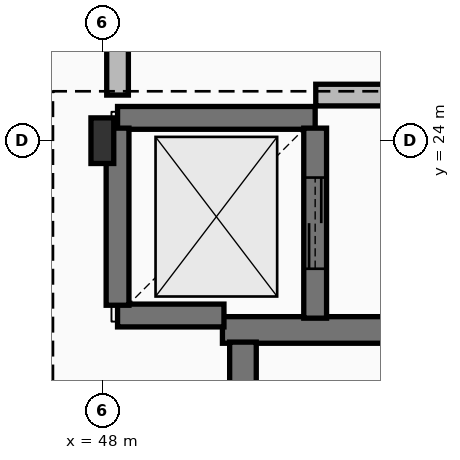
"""IFC4 building model, lengths in metres.
Left out: names, types, materials, properties, quantities, classifications, styles, units other than length and angle.
Written with IfcOpenShell. Run it as: python <this file> out.ifc"""

import sys

from ifc_helpers import new_model, si_unit, direction, frame, frame_2d, origin, origin_2d, place, context, subcontext, project, spatial, rectangle, i_section, extrude, element, fill, save


model = new_model("IFC4")
c1 = context("Model", 3, precision=1e-05, world=origin(), true_north=direction((0.0, 1.0)))
c2 = subcontext(c1, "Body", "Model", "MODEL_VIEW")
j1 = project(units=[si_unit("LENGTHUNIT", "METRE"), si_unit("PLANEANGLEUNIT", "RADIAN")], contexts=[c1])
p1 = place(None, origin())
s1 = spatial("IfcSite", under=j1, at=p1, CompositionType="ELEMENT")
p2 = place(p1, origin())
s2 = spatial("IfcBuilding", under=s1, at=p2, CompositionType="ELEMENT")
p3 = place(p2, frame((0.0, 0.0, 6.0)))
s3 = spatial("IfcBuildingStorey", under=s2, at=p3, CompositionType="ELEMENT", Elevation=6.0)
p4 = place(p3, frame((48.0, 24.0, 0.0), z_axis=(0.0, 0.0, 1.0), x_axis=(1.0, 0.0, 0.0)))
e1 = element("IfcColumn", 1, at=p4, inside=s3, PredefinedType="COLUMN", context=c2, shape_type="SweptSolid", body=[
    extrude(i_section(OverallWidth=0.3, OverallDepth=0.6, WebThickness=0.015, FlangeThickness=0.03, FilletRadius=0.027, at=origin_2d()), origin(), (0.0, 0.0, 1.0), 5.4),
])
p5 = place(p3, frame((60.73, 21.51, 0.0), z_axis=(0.0, 0.0, 1.0), x_axis=(-1.0, 0.0, 0.0)))
e2 = element("IfcWall", 2, at=p5, inside=s3, PredefinedType="SHEAR", context=c2, shape_type="SweptSolid", body=[
    extrude(rectangle(XDim=11.15, YDim=0.35, at=frame_2d((5.575, 0.0))), origin(), (0.0, 0.0, 1.0), 5.15),
])
p6 = place(p3, frame((49.85, 21.35, 0.0), z_axis=(0.0, 0.0, 1.0), x_axis=(0.0, -1.0, 0.0)))
e3 = element("IfcWall", 3, at=p6, inside=s3, PredefinedType="SHEAR", context=c2, shape_type="SweptSolid", body=[
    extrude(rectangle(XDim=5.14, YDim=0.35, at=frame_2d((2.57, 0.0))), origin(), (0.0, 0.0, 1.0), 5.15),
])
p7 = place(p3, frame((50.8, 24.3, 0.0), z_axis=(0.0, 0.0, 1.0), x_axis=(-1.0, 0.0, 0.0)))
e4 = element("IfcWall", 4, at=p7, inside=s3, PredefinedType="SHEAR", context=c2, shape_type="SweptSolid", body=[
    extrude(rectangle(XDim=2.6, YDim=0.3, at=frame_2d((1.3, 0.0))), origin(), (0.0, 0.0, 1.0), 5.15),
])
p8 = place(p3, frame((48.2, 21.7, 0.0), z_axis=(0.0, 0.0, 1.0), x_axis=(1.0, 0.0, 0.0)))
e5 = element("IfcWall", 5, at=p8, inside=s3, PredefinedType="SHEAR", context=c2, shape_type="SweptSolid", body=[
    extrude(rectangle(XDim=1.4, YDim=0.3, at=frame_2d((0.7, 0.0))), origin(), (0.0, 0.0, 1.0), 5.15),
])
p9 = place(p3, frame((50.8, 21.665, 0.0), z_axis=(0.0, 0.0, 1.0), x_axis=(0.0, 1.0, 0.0)))
e6 = element("IfcWall", 6, at=p9, inside=s3, PredefinedType="SHEAR", context=c2, shape_type="SweptSolid", body=[
    extrude(rectangle(XDim=2.5, YDim=0.3, at=frame_2d((1.25, 0.0))), origin(), (0.0, 0.0, 1.0), 5.15),
])
p10 = place(p9, frame((0.65, 0.0, 0.0)))
e7 = element("IfcOpeningElement", 7, at=p10, cuts=e6, PredefinedType="OPENING", context=c2, shape_type="SweptSolid", body=[
    extrude(rectangle(XDim=1.2, YDim=2.2, at=frame_2d((0.6, 1.1))), frame((0.0, 0.16, 0.0), z_axis=(0.0, -1.0, 0.0), x_axis=(1.0, 0.0, 0.0)), (0.0, 0.0, 1.0), 0.32),
])
p11 = place(p3, frame((48.2, 24.165, 0.0), z_axis=(0.0, 0.0, 1.0), x_axis=(0.0, -1.0, 0.0)))
e8 = element("IfcWall", 8, at=p11, inside=s3, PredefinedType="SHEAR", context=c2, shape_type="SweptSolid", body=[
    extrude(rectangle(XDim=2.33, YDim=0.3, at=frame_2d((1.165, 0.0))), origin(), (0.0, 0.0, 1.0), 5.15),
])
p12 = place(p3, frame((50.808, 24.6, 0.0), z_axis=(0.0, 0.0, 1.0), x_axis=(1.0, 0.0, 0.0)))
e9 = element("IfcWall", 9, at=p12, inside=s3, PredefinedType="PLUMBINGWALL", context=c2, shape_type="SweptSolid", body=[
    extrude(rectangle(XDim=3.592, YDim=0.285, at=frame_2d((1.796, 0.0))), origin(), (0.0, 0.0, 1.0), 5.15),
])
p13 = place(p12, frame((1.441, 0.0, 0.0)))
e10 = element("IfcOpeningElement", 10, at=p13, cuts=e9, PredefinedType="OPENING", context=c2, shape_type="SweptSolid", body=[
    extrude(rectangle(XDim=1.19, YDim=2.34, at=frame_2d((0.595, 1.17))), frame((0.0, 0.152, 0.0), z_axis=(0.0, -1.0, 0.0), x_axis=(1.0, 0.0, 0.0)), (0.0, 0.0, 1.0), 0.305),
])
p14 = place(p3, frame((48.2, 33.854, 0.0), z_axis=(0.0, 0.0, 1.0), x_axis=(0.0, -1.0, 0.0)))
e11 = element("IfcWall", 11, at=p14, inside=s3, PredefinedType="PLUMBINGWALL", context=c2, shape_type="SweptSolid", body=[
    extrude(rectangle(XDim=9.253, YDim=0.285, at=frame_2d((4.627, 0.0))), origin(), (0.0, 0.0, 1.0), 4.22),
])
p15 = place(p10, origin())
e12 = element("IfcDoor", 12, at=p15, inside=s3, OperationType="DOUBLE_DOOR_SLIDING", PredefinedType="DOOR", context=c2, shape_type="SweptSolid", body=[
    extrude(rectangle(XDim=1.2, YDim=2.2, at=frame_2d((0.6, 1.1))), frame((0.0, 0.025, 0.0), z_axis=(0.0, -1.0, 0.0), x_axis=(1.0, 0.0, 0.0)), (0.0, 0.0, 1.0), 0.05),
])
fill(e7, e12)
save(model, sys.argv[1])
